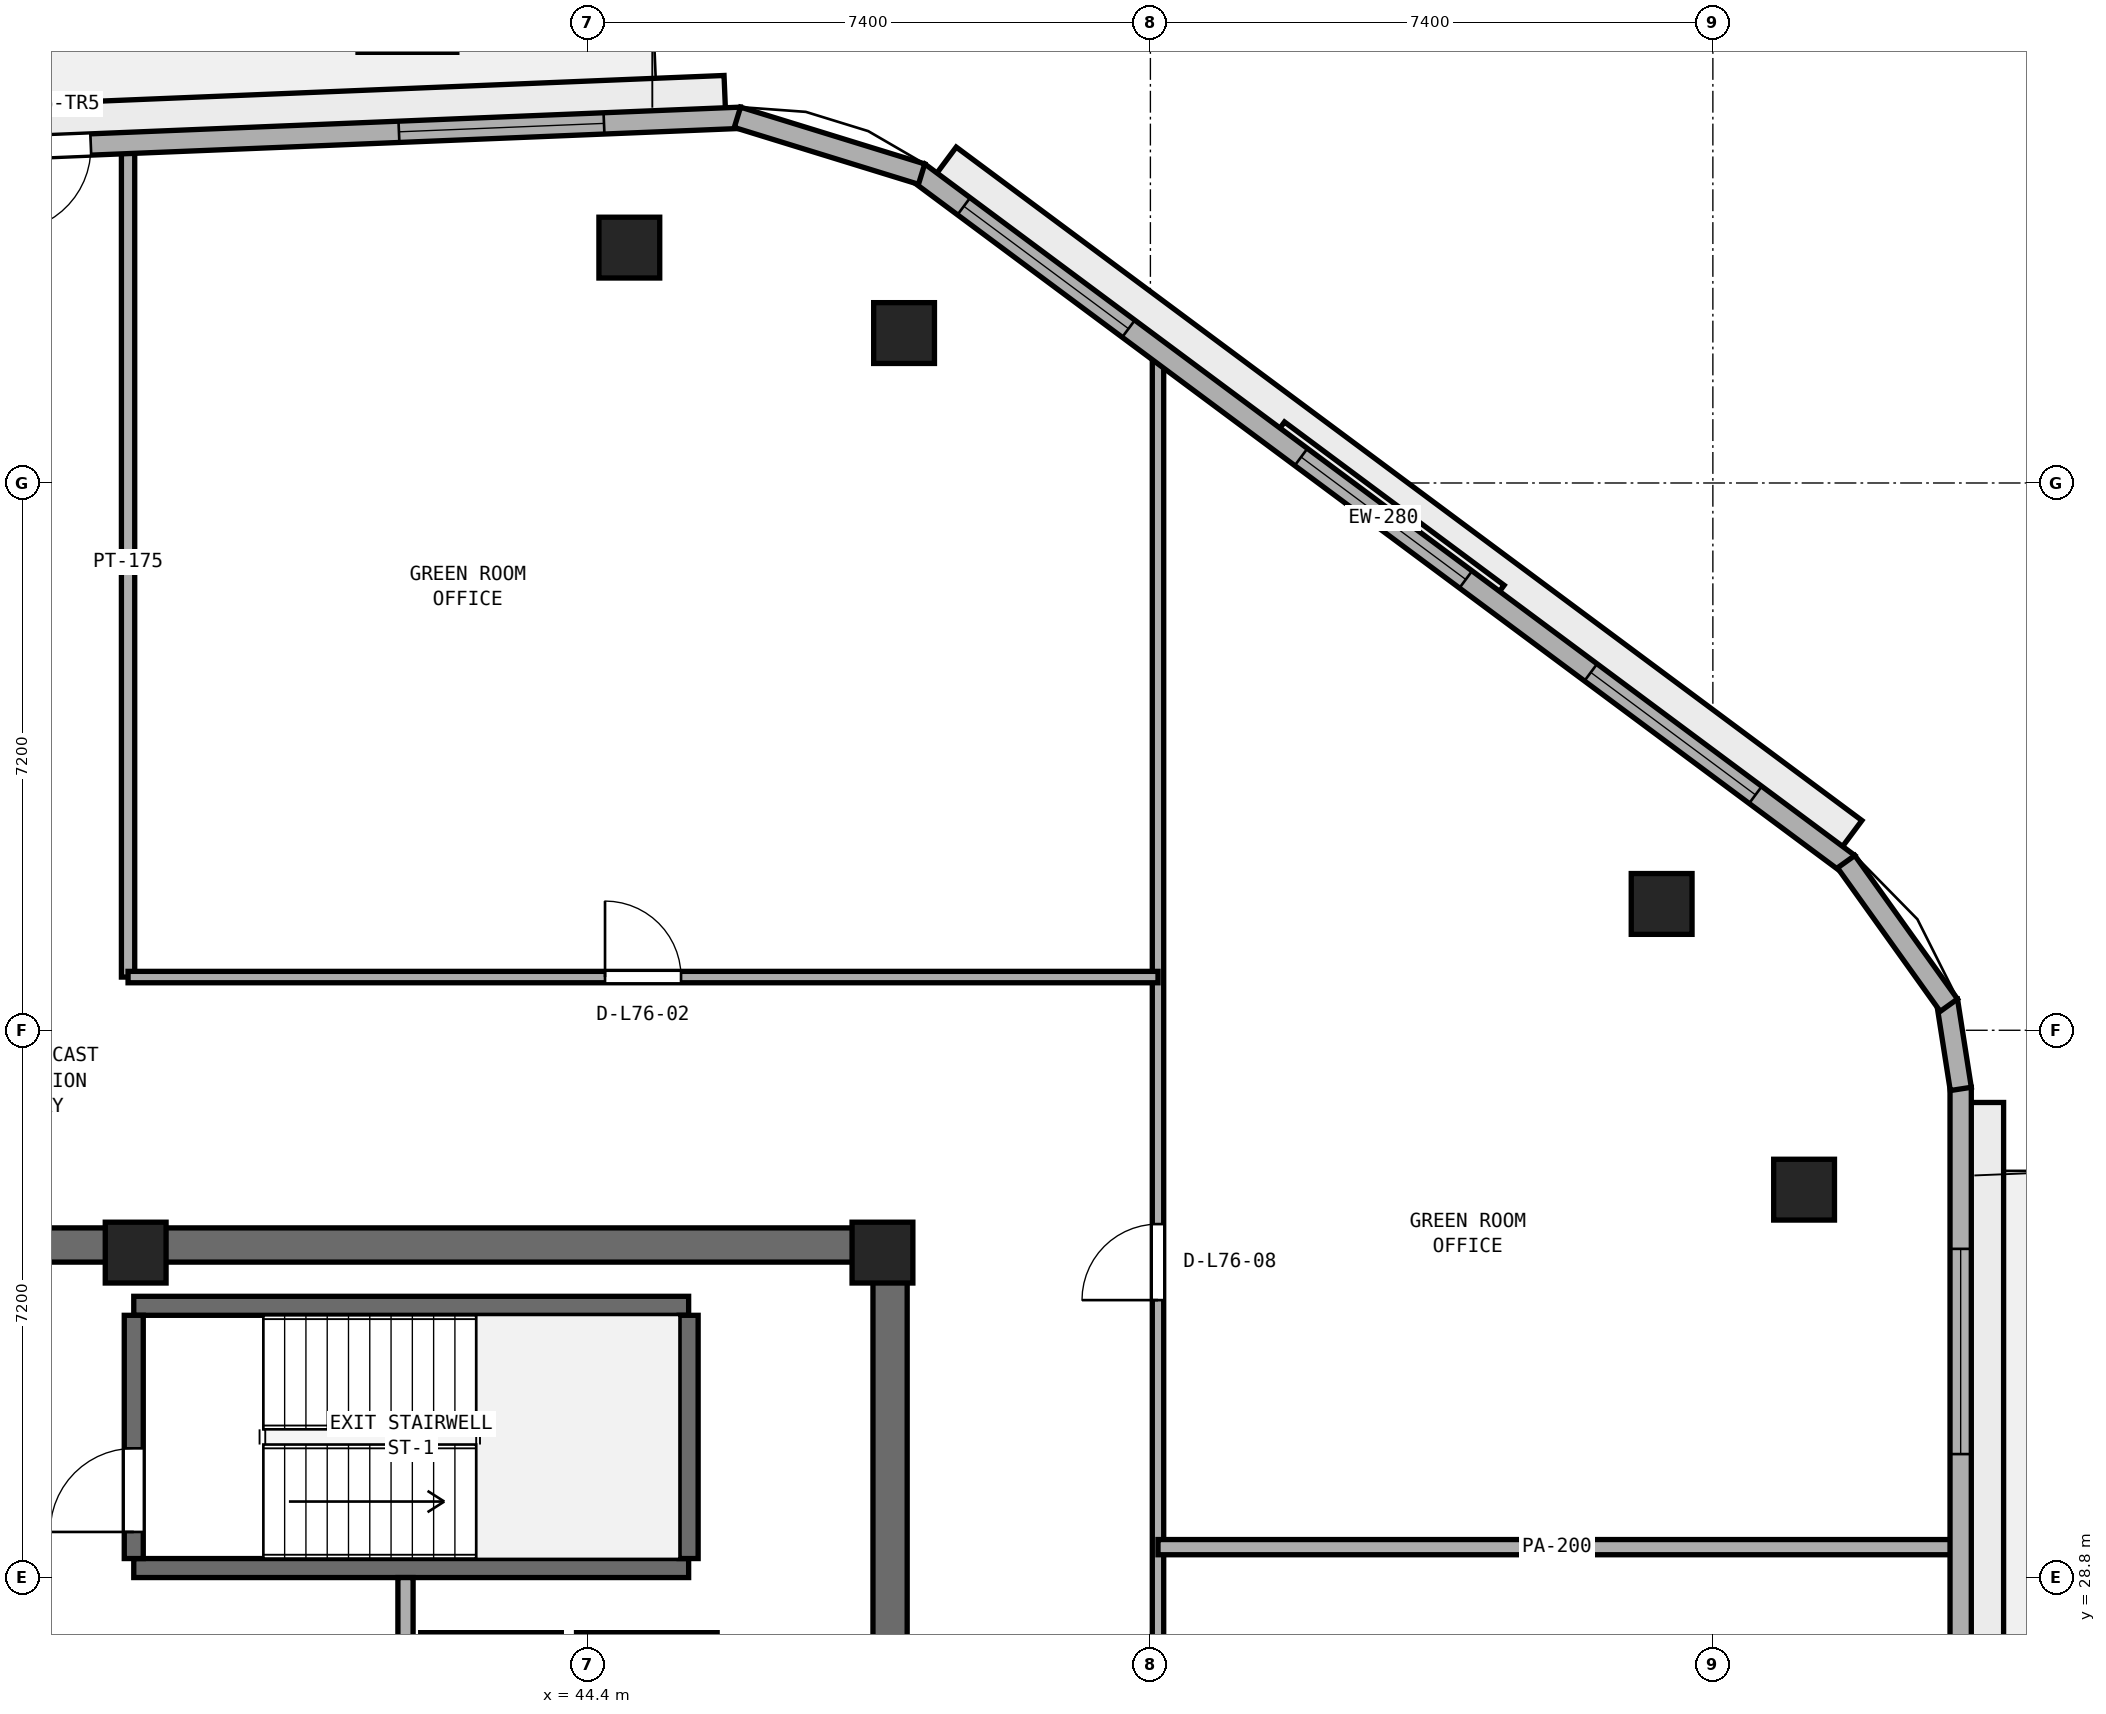
"""IFC4 building model, lengths in metres.
Left out: names, types, materials, properties, quantities, classifications, styles, units other than length and angle.
Written with IfcOpenShell. Run it as: python <this file> out.ifc"""

import sys

from ifc_helpers import new_model, si_unit, direction, frame, frame_2d, origin, origin_2d, place, context, subcontext, project, spatial, rectangle, extrude, element, fill, save


model = new_model("IFC4")
c1 = context("Model", 3, precision=1e-05, world=origin(), true_north=direction((0.0, 1.0)))
c2 = subcontext(c1, "Body", "Model", "MODEL_VIEW")
j1 = project(units=[si_unit("LENGTHUNIT", "METRE"), si_unit("PLANEANGLEUNIT", "RADIAN")], contexts=[c1])
p1 = place(None, origin())
s1 = spatial("IfcSite", under=j1, at=p1, CompositionType="ELEMENT")
p2 = place(p1, origin())
s2 = spatial("IfcBuilding", under=s1, at=p2, CompositionType="ELEMENT")
p3 = place(p2, frame((0.0, 0.0, 297.2)))
s3 = spatial("IfcBuildingStorey", under=s2, at=p3, CompositionType="ELEMENT", Elevation=297.2)
p4 = place(p3, frame((25.4, 33.175, 0.0), z_axis=(0.0, 0.0, 1.0), x_axis=(1.0, 0.0, 0.0)))
e1 = element("IfcWall", 1, at=p4, inside=s3, PredefinedType="SHEAR", context=c2, shape_type="SweptSolid", body=[
    extrude(rectangle(XDim=23.2, YDim=0.45, at=frame_2d((11.6, 0.0))), origin(), (0.0, 0.0, 1.0), 3.54),
])
p5 = place(p3, frame((48.375, 17.45, 0.0), z_axis=(0.0, 0.0, 1.0), x_axis=(0.0, 1.0, 0.0)))
e2 = element("IfcWall", 2, at=p5, inside=s3, PredefinedType="SHEAR", context=c2, shape_type="SweptSolid", body=[
    extrude(rectangle(XDim=15.5, YDim=0.45, at=frame_2d((7.75, 0.0))), origin(), (0.0, 0.0, 1.0), 3.54),
])
p6 = place(p5, frame((5.85, 0.0, 0.0)))
e3 = element("IfcOpeningElement", 3, at=p6, cuts=e2, PredefinedType="OPENING", context=c2, shape_type="SweptSolid", body=[
    extrude(rectangle(XDim=1.5, YDim=2.15, at=frame_2d((0.75, 1.075))), frame((0.0, 0.235, 0.0), z_axis=(0.0, -1.0, 0.0), x_axis=(1.0, 0.0, 0.0)), (0.0, 0.0, 1.0), 0.47),
])
for number, where, z_axis, x_axis in (
    (4, (48.275, 33.075, 0.0), (0.0, 0.0, 1.0), (1.0, 0.0, 0.0)),
    (5, (38.45, 33.075, 0.0), (0.0, 0.0, 1.0), (1.0, 0.0, 0.0)),
):
    element("IfcColumn", number, at=place(p3, frame(where, z_axis=z_axis, x_axis=x_axis)), inside=s3, PredefinedType="PILASTER", context=c2, shape_type="SweptSolid", body=[
        extrude(rectangle(XDim=0.8, YDim=0.8, at=origin_2d()), origin(), (0.0, 0.0, 1.0), 3.8),
    ])
for number, where, z_axis, x_axis in (
    (6, (60.4, 33.903, 0.0), (0.0, 0.0, 1.0), (1.0, 0.0, 0.0)),
    (7, (58.526, 37.662, 0.0), (0.0, 0.0, 1.0), (1.0, 0.0, 0.0)),
    (8, (48.559, 45.173, 0.0), (0.0, 0.0, 1.0), (1.0, 0.0, 0.0)),
    (9, (44.945, 46.297, 0.0), (0.0, 0.0, 1.0), (1.0, 0.0, 0.0)),
):
    element("IfcColumn", number, at=place(p3, frame(where, z_axis=z_axis, x_axis=x_axis)), inside=s3, PredefinedType="COLUMN", context=c2, shape_type="SweptSolid", body=[
        extrude(rectangle(XDim=0.8, YDim=0.8, at=origin_2d()), origin(), (0.0, 0.0, 1.0), 3.8),
    ])
for number, where, z_axis, x_axis in (
    (10, (38.425, 28.925, 0.0), (0.0, 0.0, 1.0), (1.0, 0.0, 0.0)),
    (11, (38.425, 32.375, 0.0), (0.0, 0.0, 1.0), (1.0, 0.0, 0.0)),
):
    element("IfcWall", number, at=place(p3, frame(where, z_axis=z_axis, x_axis=x_axis)), inside=s3, PredefinedType="SHEAR", context=c2, shape_type="SweptSolid", body=[
        extrude(rectangle(XDim=7.3, YDim=0.25, at=frame_2d((3.65, 0.0))), origin(), (0.0, 0.0, 1.0), 3.54),
    ])
p7 = place(p3, frame((38.425, 29.05, 0.0), z_axis=(0.0, 0.0, 1.0), x_axis=(0.0, 1.0, 0.0)))
e12 = element("IfcWall", 12, at=p7, inside=s3, PredefinedType="SHEAR", context=c2, shape_type="SweptSolid", body=[
    extrude(rectangle(XDim=3.2, YDim=0.25, at=frame_2d((1.6, 0.0))), origin(), (0.0, 0.0, 1.0), 3.54),
])
p8 = place(p7, frame((0.35, 0.0, 0.0)))
e13 = element("IfcOpeningElement", 13, at=p8, cuts=e12, PredefinedType="OPENING", context=c2, shape_type="SweptSolid", body=[
    extrude(rectangle(XDim=1.1, YDim=2.15, at=frame_2d((0.55, 1.075))), frame((0.0, 0.135, 0.0), z_axis=(0.0, -1.0, 0.0), x_axis=(1.0, 0.0, 0.0)), (0.0, 0.0, 1.0), 0.27),
])
p9 = place(p3, frame((45.725, 29.05, 0.0), z_axis=(0.0, 0.0, 1.0), x_axis=(0.0, 1.0, 0.0)))
e14 = element("IfcWall", 14, at=p9, inside=s3, PredefinedType="SHEAR", context=c2, shape_type="SweptSolid", body=[
    extrude(rectangle(XDim=3.2, YDim=0.25, at=frame_2d((1.6, 0.0))), origin(), (0.0, 0.0, 1.0), 3.54),
])
for number, where, z_axis, x_axis in (
    (15, (42.2, 27.95, 0.0), (0.0, 0.0, 1.0), (1.0, 0.0, 0.0)),
    (16, (44.25, 27.95, 0.0), (0.0, 0.0, 1.0), (1.0, 0.0, 0.0)),
):
    element("IfcWall", number, at=place(p3, frame(where, z_axis=z_axis, x_axis=x_axis)), inside=s3, PredefinedType="SHEAR", context=c2, shape_type="SweptSolid", body=[
        extrude(rectangle(XDim=1.85, YDim=0.25, at=frame_2d((0.925, 0.0))), origin(), (0.0, 0.0, 1.0), 3.54),
    ])
p10 = place(p3, frame((42.0, 22.75, 0.0), z_axis=(0.0, 0.0, 1.0), x_axis=(0.0, 1.0, 0.0)))
e17 = element("IfcWall", 17, at=p10, inside=s3, PredefinedType="SOLIDWALL", context=c2, shape_type="SweptSolid", body=[
    extrude(rectangle(XDim=6.05, YDim=0.2, at=frame_2d((3.025, 0.0))), origin(), (0.0, 0.0, 1.0), 3.54),
])
p11 = place(p10, frame((0.65, 0.0, 0.0)))
e18 = element("IfcOpeningElement", 18, at=p11, cuts=e17, PredefinedType="OPENING", context=c2, shape_type="SweptSolid", body=[
    extrude(rectangle(XDim=1.2, YDim=2.15, at=frame_2d((0.6, 1.075))), frame((0.0, 0.11, 0.0), z_axis=(0.0, -1.0, 0.0), x_axis=(1.0, 0.0, 0.0)), (0.0, 0.0, 1.0), 0.22),
])
p12 = place(p3, frame((51.9, 22.6, 0.0), z_axis=(0.0, 0.0, 1.0), x_axis=(0.0, 1.0, 0.0)))
e19 = element("IfcWall", 19, at=p12, inside=s3, PredefinedType="PARTITIONING", context=c2, shape_type="SweptSolid", body=[
    extrude(rectangle(XDim=22.376, YDim=0.15, at=frame_2d((11.188, 0.0))), origin(), (0.0, 0.0, 1.0), 3.54),
])
p13 = place(p12, frame((2.92, 0.0, 0.0)))
e20 = element("IfcOpeningElement", 20, at=p13, cuts=e19, PredefinedType="OPENING", context=c2, shape_type="SweptSolid", body=[
    extrude(rectangle(XDim=1.0, YDim=2.12, at=frame_2d((0.5, 1.06))), frame((0.0, 0.085, 0.0), z_axis=(0.0, -1.0, 0.0), x_axis=(1.0, 0.0, 0.0)), (0.0, 0.0, 1.0), 0.17),
])
p14 = place(p12, frame((9.85, 0.0, 0.0)))
e21 = element("IfcOpeningElement", 21, at=p14, cuts=e19, PredefinedType="OPENING", context=c2, shape_type="SweptSolid", body=[
    extrude(rectangle(XDim=1.0, YDim=2.12, at=frame_2d((0.5, 1.06))), frame((0.0, 0.085, 0.0), z_axis=(0.0, -1.0, 0.0), x_axis=(1.0, 0.0, 0.0)), (0.0, 0.0, 1.0), 0.17),
])
p15 = place(p3, frame((38.35, 36.7, 0.0), z_axis=(0.0, 0.0, 1.0), x_axis=(0.0, 1.0, 0.0)))
e22 = element("IfcWall", 22, at=p15, inside=s3, PredefinedType="PARTITIONING", context=c2, shape_type="SweptSolid", body=[
    extrude(rectangle(XDim=10.909, YDim=0.175, at=frame_2d((5.454, 0.0))), origin(), (0.0, 0.0, 1.0), 3.54),
])
p16 = place(p3, frame((51.9, 29.2, 0.0), z_axis=(0.0, 0.0, 1.0), x_axis=(1.0, 0.0, 0.0)))
e23 = element("IfcWall", 23, at=p16, inside=s3, PredefinedType="PARTITIONING", context=c2, shape_type="SweptSolid", body=[
    extrude(rectangle(XDim=10.495, YDim=0.2, at=frame_2d((5.248, 0.0))), origin(), (0.0, 0.0, 1.0), 3.54),
])
p17 = place(p3, frame((38.35, 36.7, 0.0), z_axis=(0.0, 0.0, 1.0), x_axis=(1.0, 0.0, 0.0)))
e24 = element("IfcWall", 24, at=p17, inside=s3, PredefinedType="PARTITIONING", context=c2, shape_type="SweptSolid", body=[
    extrude(rectangle(XDim=13.55, YDim=0.15, at=frame_2d((6.775, 0.0))), origin(), (0.0, 0.0, 1.0), 3.54),
])
p18 = place(p17, frame((6.275, 0.0, 0.0)))
e25 = element("IfcOpeningElement", 25, at=p18, cuts=e24, PredefinedType="OPENING", context=c2, shape_type="SweptSolid", body=[
    extrude(rectangle(XDim=1.0, YDim=2.12, at=frame_2d((0.5, 1.06))), frame((0.0, 0.085, 0.0), z_axis=(0.0, -1.0, 0.0), x_axis=(1.0, 0.0, 0.0)), (0.0, 0.0, 1.0), 0.17),
])
p19 = place(p3, frame((62.46, 16.396, 0.0), z_axis=(0.0, 0.0, 1.0), x_axis=(0.0, 1.0, 0.0)))
e26 = element("IfcWall", 26, at=p19, inside=s3, PredefinedType="STANDARD", context=c2, shape_type="SweptSolid", body=[
    extrude(rectangle(XDim=18.854, YDim=0.28, at=frame_2d((9.427, 0.0))), origin(), (0.0, 0.0, 1.0), 3.54),
])
p20 = place(p19, frame((8.877, 0.0, 0.0)))
e27 = element("IfcOpeningElement", 27, at=p20, cuts=e26, PredefinedType="OPENING", context=c2, shape_type="SweptSolid", body=[
    extrude(rectangle(XDim=1.1, YDim=2.2, at=frame_2d((0.55, 1.1))), frame((0.0, 0.15, 0.0), z_axis=(0.0, -1.0, 0.0), x_axis=(1.0, 0.0, 0.0)), (0.0, 0.0, 1.0), 0.3),
])
p21 = place(p19, frame((1.626, 0.0, 0.9)))
e28 = element("IfcOpeningElement", 28, at=p21, cuts=e26, PredefinedType="OPENING", context=c2, shape_type="SweptSolid", body=[
    extrude(rectangle(XDim=2.7, YDim=1.75, at=frame_2d((1.35, 0.875))), frame((0.0, 0.15, 0.0), z_axis=(0.0, -1.0, 0.0), x_axis=(1.0, 0.0, 0.0)), (0.0, 0.0, 1.0), 0.3),
])
p22 = place(p19, frame((14.029, 0.0, 0.9)))
e29 = element("IfcOpeningElement", 29, at=p22, cuts=e26, PredefinedType="OPENING", context=c2, shape_type="SweptSolid", body=[
    extrude(rectangle(XDim=2.7, YDim=1.75, at=frame_2d((1.35, 0.875))), frame((0.0, 0.15, 0.0), z_axis=(0.0, -1.0, 0.0), x_axis=(1.0, 0.0, 0.0)), (0.0, 0.0, 1.0), 0.3),
])
p23 = place(p3, frame((60.984, 38.187, 0.0), z_axis=(0.0, 0.0, 1.0), x_axis=(-0.802485144343, 0.596672098484, 0.0)))
e30 = element("IfcWall", 30, at=p23, inside=s3, PredefinedType="STANDARD", context=c2, shape_type="SweptSolid", body=[
    extrude(rectangle(XDim=15.248, YDim=0.28, at=frame_2d((7.624, 0.0))), origin(), (0.0, 0.0, 1.0), 3.54),
])
p24 = place(p23, frame((1.525, 0.0, 0.9)))
e31 = element("IfcOpeningElement", 31, at=p24, cuts=e30, PredefinedType="OPENING", context=c2, shape_type="SweptSolid", body=[
    extrude(rectangle(XDim=2.7, YDim=1.75, at=frame_2d((1.35, 0.875))), frame((0.0, 0.15, 0.0), z_axis=(0.0, -1.0, 0.0), x_axis=(1.0, 0.0, 0.0)), (0.0, 0.0, 1.0), 0.3),
])
p25 = place(p23, frame((6.274, 0.0, 0.9)))
e32 = element("IfcOpeningElement", 32, at=p25, cuts=e30, PredefinedType="OPENING", context=c2, shape_type="SweptSolid", body=[
    extrude(rectangle(XDim=2.7, YDim=1.75, at=frame_2d((1.35, 0.875))), frame((0.0, 0.15, 0.0), z_axis=(0.0, -1.0, 0.0), x_axis=(1.0, 0.0, 0.0)), (0.0, 0.0, 1.0), 0.3),
])
p26 = place(p23, frame((11.803, 0.0, 0.9)))
e33 = element("IfcOpeningElement", 33, at=p26, cuts=e30, PredefinedType="OPENING", context=c2, shape_type="SweptSolid", body=[
    extrude(rectangle(XDim=2.7, YDim=1.75, at=frame_2d((1.35, 0.875))), frame((0.0, 0.15, 0.0), z_axis=(0.0, -1.0, 0.0), x_axis=(1.0, 0.0, 0.0)), (0.0, 0.0, 1.0), 0.3),
])
p27 = place(p3, frame((46.414, 48.005, 0.0), z_axis=(0.0, 0.0, 1.0), x_axis=(-0.999156194126, -0.041071885021, 0.0)))
e34 = element("IfcWall", 34, at=p27, inside=s3, PredefinedType="STANDARD", context=c2, shape_type="SweptSolid", body=[
    extrude(rectangle(XDim=16.923, YDim=0.28, at=frame_2d((8.461, 0.0))), origin(), (0.0, 0.0, 1.0), 3.54),
])
p28 = place(p27, frame((8.562, 0.0, 0.0)))
e35 = element("IfcOpeningElement", 35, at=p28, cuts=e34, PredefinedType="OPENING", context=c2, shape_type="SweptSolid", body=[
    extrude(rectangle(XDim=1.1, YDim=2.2, at=frame_2d((0.55, 1.1))), frame((0.0, 0.15, 0.0), z_axis=(0.0, -1.0, 0.0), x_axis=(1.0, 0.0, 0.0)), (0.0, 0.0, 1.0), 0.3),
])
p29 = place(p27, frame((1.804, 0.0, 0.9)))
e36 = element("IfcOpeningElement", 36, at=p29, cuts=e34, PredefinedType="OPENING", context=c2, shape_type="SweptSolid", body=[
    extrude(rectangle(XDim=2.7, YDim=1.75, at=frame_2d((1.35, 0.875))), frame((0.0, 0.15, 0.0), z_axis=(0.0, -1.0, 0.0), x_axis=(1.0, 0.0, 0.0)), (0.0, 0.0, 1.0), 0.3),
])
p30 = place(p27, frame((12.419, 0.0, 0.9)))
e37 = element("IfcOpeningElement", 37, at=p30, cuts=e34, PredefinedType="OPENING", context=c2, shape_type="SweptSolid", body=[
    extrude(rectangle(XDim=2.7, YDim=1.75, at=frame_2d((1.35, 0.875))), frame((0.0, 0.15, 0.0), z_axis=(0.0, -1.0, 0.0), x_axis=(1.0, 0.0, 0.0)), (0.0, 0.0, 1.0), 0.3),
])
p31 = place(p3, frame((62.462, 35.229, 0.0), z_axis=(0.0, 0.0, 1.0), x_axis=(-0.15458604025, 0.987979329824, 0.0)))
e38 = element("IfcWall", 38, at=p31, inside=s3, PredefinedType="STANDARD", context=c2, shape_type="SweptSolid", body=[
    extrude(rectangle(XDim=1.175, YDim=0.28, at=frame_2d((0.587, 0.0))), origin(), (0.0, 0.0, 1.0), 3.54),
])
p32 = place(p3, frame((62.304, 36.33, 0.0), z_axis=(0.0, 0.0, 1.0), x_axis=(-0.581795068472, 0.81333541562, 0.0)))
e39 = element("IfcWall", 39, at=p32, inside=s3, PredefinedType="STANDARD", context=c2, shape_type="SweptSolid", body=[
    extrude(rectangle(XDim=2.322, YDim=0.28, at=frame_2d((1.161, 0.0))), origin(), (0.0, 0.0, 1.0), 3.54),
])
p33 = place(p3, frame((48.79, 47.264, 0.0), z_axis=(0.0, 0.0, 1.0), x_axis=(-0.955593560977, 0.294687879322, 0.0)))
e40 = element("IfcWall", 40, at=p33, inside=s3, PredefinedType="STANDARD", context=c2, shape_type="SweptSolid", body=[
    extrude(rectangle(XDim=2.536, YDim=0.28, at=frame_2d((1.268, 0.0))), origin(), (0.0, 0.0, 1.0), 3.54),
])
p34 = place(p8, origin())
e41 = element("IfcDoor", 41, at=p34, inside=s3, OperationType="SINGLE_SWING_LEFT", PredefinedType="DOOR", context=c2, shape_type="SweptSolid", body=[
    extrude(rectangle(XDim=1.1, YDim=2.15, at=frame_2d((0.55, 1.075))), frame((0.0, 0.025, 0.0), z_axis=(0.0, -1.0, 0.0), x_axis=(1.0, 0.0, 0.0)), (0.0, 0.0, 1.0), 0.05),
])
fill(e13, e41)
p35 = place(p18, origin())
e42 = element("IfcDoor", 42, at=p35, inside=s3, OperationType="SINGLE_SWING_LEFT", PredefinedType="DOOR", context=c2, shape_type="SweptSolid", body=[
    extrude(rectangle(XDim=1.0, YDim=2.12, at=frame_2d((0.5, 1.06))), frame((0.0, 0.025, 0.0), z_axis=(0.0, -1.0, 0.0), x_axis=(1.0, 0.0, 0.0)), (0.0, 0.0, 1.0), 0.05),
])
fill(e25, e42)
p36 = place(p14, origin())
e43 = element("IfcDoor", 43, at=p36, inside=s3, OperationType="SINGLE_SWING_LEFT", PredefinedType="DOOR", context=c2, shape_type="SweptSolid", body=[
    extrude(rectangle(XDim=1.0, YDim=2.12, at=frame_2d((0.5, 1.06))), frame((0.0, 0.025, 0.0), z_axis=(0.0, -1.0, 0.0), x_axis=(1.0, 0.0, 0.0)), (0.0, 0.0, 1.0), 0.05),
])
fill(e21, e43)
p37 = place(p22, origin())
e44 = element("IfcWindow", 44, at=p37, inside=s3, PartitioningType="SINGLE_PANEL", PredefinedType="WINDOW", context=c2, shape_type="SweptSolid", body=[
    extrude(rectangle(XDim=2.7, YDim=1.75, at=frame_2d((1.35, 0.875))), frame((0.0, 0.03, 0.0), z_axis=(0.0, -1.0, 0.0), x_axis=(1.0, 0.0, 0.0)), (0.0, 0.0, 1.0), 0.06),
])
fill(e29, e44)
p38 = place(p24, origin())
e45 = element("IfcWindow", 45, at=p38, inside=s3, PartitioningType="SINGLE_PANEL", PredefinedType="WINDOW", context=c2, shape_type="SweptSolid", body=[
    extrude(rectangle(XDim=2.7, YDim=1.75, at=frame_2d((1.35, 0.875))), frame((0.0, 0.03, 0.0), z_axis=(0.0, -1.0, 0.0), x_axis=(1.0, 0.0, 0.0)), (0.0, 0.0, 1.0), 0.06),
])
fill(e31, e45)
p39 = place(p25, origin())
e46 = element("IfcWindow", 46, at=p39, inside=s3, PartitioningType="SINGLE_PANEL", PredefinedType="WINDOW", context=c2, shape_type="SweptSolid", body=[
    extrude(rectangle(XDim=2.7, YDim=1.75, at=frame_2d((1.35, 0.875))), frame((0.0, 0.03, 0.0), z_axis=(0.0, -1.0, 0.0), x_axis=(1.0, 0.0, 0.0)), (0.0, 0.0, 1.0), 0.06),
])
fill(e32, e46)
p40 = place(p26, origin())
e47 = element("IfcWindow", 47, at=p40, inside=s3, PartitioningType="SINGLE_PANEL", PredefinedType="WINDOW", context=c2, shape_type="SweptSolid", body=[
    extrude(rectangle(XDim=2.7, YDim=1.75, at=frame_2d((1.35, 0.875))), frame((0.0, 0.03, 0.0), z_axis=(0.0, -1.0, 0.0), x_axis=(1.0, 0.0, 0.0)), (0.0, 0.0, 1.0), 0.06),
])
fill(e33, e47)
p41 = place(p28, origin())
e48 = element("IfcDoor", 48, at=p41, inside=s3, OperationType="SINGLE_SWING_RIGHT", PredefinedType="DOOR", context=c2, shape_type="SweptSolid", body=[
    extrude(rectangle(XDim=1.1, YDim=2.2, at=frame_2d((0.55, 1.1))), frame((0.0, 0.025, 0.0), z_axis=(0.0, -1.0, 0.0), x_axis=(1.0, 0.0, 0.0)), (0.0, 0.0, 1.0), 0.05),
])
fill(e35, e48)
p42 = place(p29, origin())
e49 = element("IfcWindow", 49, at=p42, inside=s3, PartitioningType="SINGLE_PANEL", PredefinedType="WINDOW", context=c2, shape_type="SweptSolid", body=[
    extrude(rectangle(XDim=2.7, YDim=1.75, at=frame_2d((1.35, 0.875))), frame((0.0, 0.03, 0.0), z_axis=(0.0, -1.0, 0.0), x_axis=(1.0, 0.0, 0.0)), (0.0, 0.0, 1.0), 0.06),
])
fill(e36, e49)
save(model, sys.argv[1])
